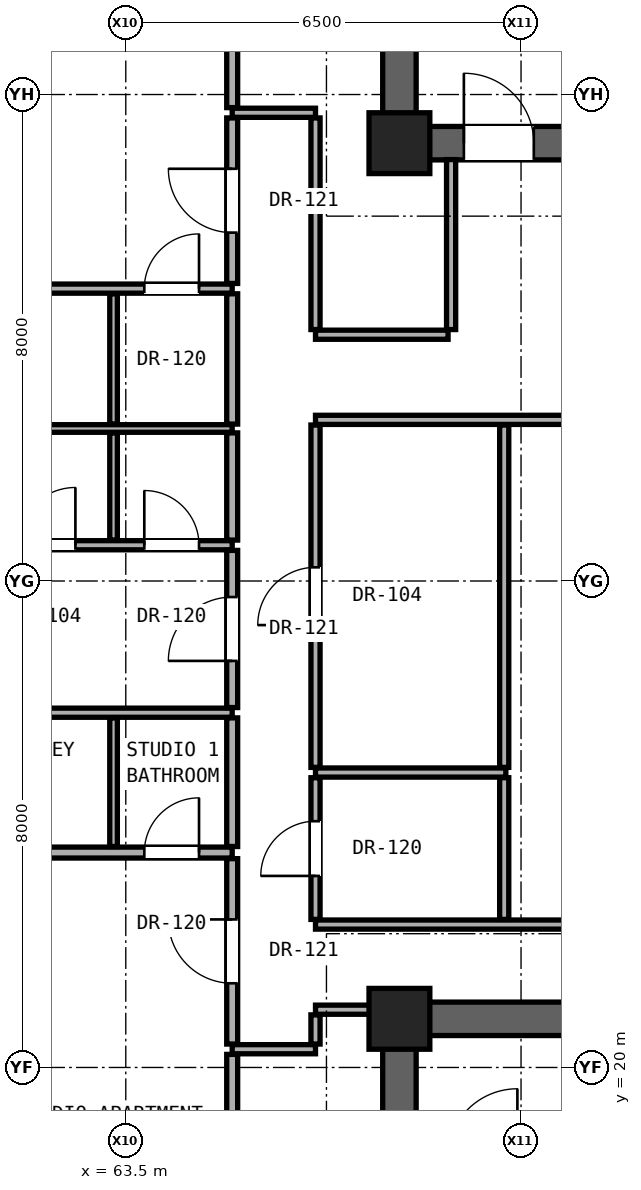
"""IFC4 building model, lengths in metres.
Left out: names, types, materials, properties, quantities, classifications, styles, units other than length and angle.
Written with IfcOpenShell. Run it as: python <this file> out.ifc"""

import sys

from ifc_helpers import new_model, si_unit, direction, frame, frame_2d, origin, origin_2d, place, context, subcontext, project, spatial, rectangle, extrude, element, fill, save


model = new_model("IFC4")
c1 = context("Model", 3, precision=1e-05, world=origin(), true_north=direction((0.0, 1.0)))
c2 = subcontext(c1, "Body", "Model", "MODEL_VIEW")
j1 = project(units=[si_unit("LENGTHUNIT", "METRE"), si_unit("PLANEANGLEUNIT", "RADIAN")], contexts=[c1])
p1 = place(None, origin())
s1 = spatial("IfcSite", under=j1, at=p1, CompositionType="ELEMENT")
p2 = place(p1, origin())
s2 = spatial("IfcBuilding", under=s1, at=p2, CompositionType="ELEMENT")
p3 = place(p2, frame((0.0, 0.0, 164.15)))
s3 = spatial("IfcBuildingStorey", under=s2, at=p3, CompositionType="ELEMENT", Elevation=164.15)
for number, where, z_axis, x_axis in (
    (1, (68.0, 20.8, 0.0), (0.0, 0.0, 1.0), (1.0, 0.0, 0.0)),
    (2, (68.0, 35.2, 0.0), (0.0, 0.0, 1.0), (1.0, 0.0, 0.0)),
):
    element("IfcColumn", number, at=place(p3, frame(where, z_axis=z_axis, x_axis=x_axis)), inside=s3, PredefinedType="COLUMN", context=c2, shape_type="SweptSolid", body=[
        extrude(rectangle(XDim=1.0, YDim=1.0, at=origin_2d()), origin(), (0.0, 0.0, 1.0), 3.25),
    ])
p4 = place(p3, frame((68.0, 35.2, 0.0), z_axis=(0.0, 0.0, 1.0), x_axis=(0.0, 1.0, 0.0)))
e3 = element("IfcWall", 3, at=p4, inside=s3, PredefinedType="SHEAR", context=c2, shape_type="SweptSolid", body=[
    extrude(rectangle(XDim=5.6, YDim=0.55, at=frame_2d((2.8, 0.0))), origin(), (0.0, 0.0, 1.0), 3.05),
])
p5 = place(p3, frame((68.0, 35.2, 0.0), z_axis=(0.0, 0.0, 1.0), x_axis=(1.0, 0.0, 0.0)))
e4 = element("IfcWall", 4, at=p5, inside=s3, PredefinedType="SHEAR", context=c2, shape_type="SweptSolid", body=[
    extrude(rectangle(XDim=17.0, YDim=0.55, at=frame_2d((8.5, 0.0))), origin(), (0.0, 0.0, 1.0), 3.05),
])
p6 = place(p5, frame((1.06, 0.0, 0.0)))
e5 = element("IfcOpeningElement", 5, at=p6, cuts=e4, PredefinedType="OPENING", context=c2, shape_type="SweptSolid", body=[
    extrude(rectangle(XDim=1.15, YDim=2.2, at=frame_2d((0.575, 1.1))), frame((0.0, 0.285, 0.0), z_axis=(0.0, -1.0, 0.0), x_axis=(1.0, 0.0, 0.0)), (0.0, 0.0, 1.0), 0.57),
])
p7 = place(p5, frame((8.75, 0.0, 0.0)))
e6 = element("IfcOpeningElement", 6, at=p7, cuts=e4, PredefinedType="OPENING", context=c2, shape_type="SweptSolid", body=[
    extrude(rectangle(XDim=1.4, YDim=2.35, at=frame_2d((0.7, 1.175))), frame((0.0, 0.285, 0.0), z_axis=(0.0, -1.0, 0.0), x_axis=(1.0, 0.0, 0.0)), (0.0, 0.0, 1.0), 0.57),
])
p8 = place(p5, frame((10.77, 0.0, 0.0)))
e7 = element("IfcOpeningElement", 7, at=p8, cuts=e4, PredefinedType="OPENING", context=c2, shape_type="SweptSolid", body=[
    extrude(rectangle(XDim=1.3, YDim=2.3, at=frame_2d((0.65, 1.15))), frame((0.0, 0.285, 0.0), z_axis=(0.0, -1.0, 0.0), x_axis=(1.0, 0.0, 0.0)), (0.0, 0.0, 1.0), 0.57),
])
p9 = place(p3, frame((68.0, 15.2, 0.0), z_axis=(0.0, 0.0, 1.0), x_axis=(0.0, 1.0, 0.0)))
e8 = element("IfcWall", 8, at=p9, inside=s3, PredefinedType="SHEAR", context=c2, shape_type="SweptSolid", body=[
    extrude(rectangle(XDim=5.6, YDim=0.55, at=frame_2d((2.8, 0.0))), origin(), (0.0, 0.0, 1.0), 3.05),
])
p10 = place(p3, frame((68.0, 20.8, 0.0), z_axis=(0.0, 0.0, 1.0), x_axis=(1.0, 0.0, 0.0)))
e9 = element("IfcWall", 9, at=p10, inside=s3, PredefinedType="SHEAR", context=c2, shape_type="SweptSolid", body=[
    extrude(rectangle(XDim=17.0, YDim=0.55, at=frame_2d((8.5, 0.0))), origin(), (0.0, 0.0, 1.0), 3.05),
])
p11 = place(p10, frame((9.55, 0.0, 0.0)))
e10 = element("IfcOpeningElement", 10, at=p11, cuts=e9, PredefinedType="OPENING", context=c2, shape_type="SweptSolid", body=[
    extrude(rectangle(XDim=1.3, YDim=2.3, at=frame_2d((0.65, 1.15))), frame((0.0, 0.285, 0.0), z_axis=(0.0, -1.0, 0.0), x_axis=(1.0, 0.0, 0.0)), (0.0, 0.0, 1.0), 0.57),
])
p12 = place(p10, frame((12.05, 0.0, 0.0)))
e11 = element("IfcOpeningElement", 11, at=p12, cuts=e9, PredefinedType="OPENING", context=c2, shape_type="SweptSolid", body=[
    extrude(rectangle(XDim=1.3, YDim=2.3, at=frame_2d((0.65, 1.15))), frame((0.0, 0.285, 0.0), z_axis=(0.0, -1.0, 0.0), x_axis=(1.0, 0.0, 0.0)), (0.0, 0.0, 1.0), 0.57),
])
p13 = place(p3, frame((65.25, 20.3, 0.0), z_axis=(0.0, 0.0, 1.0), x_axis=(1.0, 0.0, 0.0)))
e12 = element("IfcWall", 12, at=p13, inside=s3, PredefinedType="PARTITIONING", context=c2, shape_type="SweptSolid", body=[
    extrude(rectangle(XDim=1.37, YDim=0.15, at=frame_2d((0.685, 0.0))), origin(), (0.0, 0.0, 1.0), 3.05),
])
p14 = place(p3, frame((66.62, 20.95, 0.0), z_axis=(0.0, 0.0, 1.0), x_axis=(1.0, 0.0, 0.0)))
e13 = element("IfcWall", 13, at=p14, inside=s3, PredefinedType="PARTITIONING", context=c2, shape_type="SweptSolid", body=[
    extrude(rectangle(XDim=1.11, YDim=0.15, at=frame_2d((0.555, 0.0))), origin(), (0.0, 0.0, 1.0), 2.442),
])
p15 = place(p3, frame((66.62, 22.35, 0.0), z_axis=(0.0, 0.0, 1.0), x_axis=(1.0, 0.0, 0.0)))
e14 = element("IfcWall", 14, at=p15, inside=s3, PredefinedType="PARTITIONING", context=c2, shape_type="SweptSolid", body=[
    extrude(rectangle(XDim=10.14, YDim=0.15, at=frame_2d((5.07, 0.0))), origin(), (0.0, 0.0, 1.0), 2.186),
])
p16 = place(p3, frame((59.154, 23.534, 0.0), z_axis=(0.0, 0.0, 1.0), x_axis=(1.0, 0.0, 0.0)))
e15 = element("IfcWall", 15, at=p16, inside=s3, PredefinedType="PARTITIONING", context=c2, shape_type="SweptSolid", body=[
    extrude(rectangle(XDim=6.096, YDim=0.18, at=frame_2d((3.048, 0.0))), origin(), (0.0, 0.0, 1.0), 2.269),
])
p17 = place(p16, frame((1.617, 0.0, 0.0)))
e16 = element("IfcOpeningElement", 16, at=p17, cuts=e15, PredefinedType="OPENING", context=c2, shape_type="SweptSolid", body=[
    extrude(rectangle(XDim=0.95, YDim=2.15, at=frame_2d((0.475, 1.075))), frame((0.0, 0.1, 0.0), z_axis=(0.0, -1.0, 0.0), x_axis=(1.0, 0.0, 0.0)), (0.0, 0.0, 1.0), 0.2),
])
p18 = place(p16, frame((4.65, 0.0, 0.0)))
e17 = element("IfcOpeningElement", 17, at=p18, cuts=e15, PredefinedType="OPENING", context=c2, shape_type="SweptSolid", body=[
    extrude(rectangle(XDim=0.9, YDim=2.1, at=frame_2d((0.45, 1.05))), frame((0.0, 0.1, 0.0), z_axis=(0.0, -1.0, 0.0), x_axis=(1.0, 0.0, 0.0)), (0.0, 0.0, 1.0), 0.2),
])
p19 = place(p3, frame((66.62, 24.85, 0.0), z_axis=(0.0, 0.0, 1.0), x_axis=(1.0, 0.0, 0.0)))
e18 = element("IfcWall", 18, at=p19, inside=s3, PredefinedType="PARTITIONING", context=c2, shape_type="SweptSolid", body=[
    extrude(rectangle(XDim=3.13, YDim=0.15, at=frame_2d((1.565, 0.0))), origin(), (0.0, 0.0, 1.0), 2.186),
])
p20 = place(p3, frame((59.154, 25.834, 0.0), z_axis=(0.0, 0.0, 1.0), x_axis=(1.0, 0.0, 0.0)))
e19 = element("IfcWall", 19, at=p20, inside=s3, PredefinedType="PARTITIONING", context=c2, shape_type="SweptSolid", body=[
    extrude(rectangle(XDim=6.096, YDim=0.15, at=frame_2d((3.048, 0.0))), origin(), (0.0, 0.0, 1.0), 2.269),
])
p21 = place(p3, frame((59.154, 28.588, 0.0), z_axis=(0.0, 0.0, 1.0), x_axis=(1.0, 0.0, 0.0)))
e20 = element("IfcWall", 20, at=p21, inside=s3, PredefinedType="PARTITIONING", context=c2, shape_type="SweptSolid", body=[
    extrude(rectangle(XDim=6.096, YDim=0.15, at=frame_2d((3.048, 0.0))), origin(), (0.0, 0.0, 1.0), 2.269),
])
p22 = place(p21, frame((2.567, 0.0, 0.0)))
e21 = element("IfcOpeningElement", 21, at=p22, cuts=e20, PredefinedType="OPENING", context=c2, shape_type="SweptSolid", body=[
    extrude(rectangle(XDim=0.95, YDim=2.15, at=frame_2d((0.475, 1.075))), frame((0.0, 0.085, 0.0), z_axis=(0.0, -1.0, 0.0), x_axis=(1.0, 0.0, 0.0)), (0.0, 0.0, 1.0), 0.17),
])
p23 = place(p21, frame((4.65, 0.0, 0.0)))
e22 = element("IfcOpeningElement", 22, at=p23, cuts=e20, PredefinedType="OPENING", context=c2, shape_type="SweptSolid", body=[
    extrude(rectangle(XDim=0.9, YDim=2.1, at=frame_2d((0.45, 1.05))), frame((0.0, 0.085, 0.0), z_axis=(0.0, -1.0, 0.0), x_axis=(1.0, 0.0, 0.0)), (0.0, 0.0, 1.0), 0.17),
])
p24 = place(p3, frame((59.154, 30.508, 0.0), z_axis=(0.0, 0.0, 1.0), x_axis=(1.0, 0.0, 0.0)))
e23 = element("IfcWall", 23, at=p24, inside=s3, PredefinedType="PARTITIONING", context=c2, shape_type="SweptSolid", body=[
    extrude(rectangle(XDim=6.096, YDim=0.125, at=frame_2d((3.048, 0.0))), origin(), (0.0, 0.0, 1.0), 2.269),
])
p25 = place(p3, frame((66.62, 30.65, 0.0), z_axis=(0.0, 0.0, 1.0), x_axis=(1.0, 0.0, 0.0)))
e24 = element("IfcWall", 24, at=p25, inside=s3, PredefinedType="PARTITIONING", context=c2, shape_type="SweptSolid", body=[
    extrude(rectangle(XDim=10.14, YDim=0.15, at=frame_2d((5.07, 0.0))), origin(), (0.0, 0.0, 1.0), 2.186),
])
p26 = place(p25, frame((6.14, 0.0, 0.0)))
e25 = element("IfcOpeningElement", 25, at=p26, cuts=e24, PredefinedType="OPENING", context=c2, shape_type="SweptSolid", body=[
    extrude(rectangle(XDim=0.95, YDim=2.15, at=frame_2d((0.475, 1.075))), frame((0.0, 0.085, 0.0), z_axis=(0.0, -1.0, 0.0), x_axis=(1.0, 0.0, 0.0)), (0.0, 0.0, 1.0), 0.17),
])
p27 = place(p3, frame((66.62, 32.05, 0.0), z_axis=(0.0, 0.0, 1.0), x_axis=(1.0, 0.0, 0.0)))
e26 = element("IfcWall", 26, at=p27, inside=s3, PredefinedType="PARTITIONING", context=c2, shape_type="SweptSolid", body=[
    extrude(rectangle(XDim=2.18, YDim=0.15, at=frame_2d((1.09, 0.0))), origin(), (0.0, 0.0, 1.0), 2.186),
])
p28 = place(p3, frame((59.154, 32.808, 0.0), z_axis=(0.0, 0.0, 1.0), x_axis=(1.0, 0.0, 0.0)))
e27 = element("IfcWall", 27, at=p28, inside=s3, PredefinedType="PARTITIONING", context=c2, shape_type="SweptSolid", body=[
    extrude(rectangle(XDim=6.096, YDim=0.15, at=frame_2d((3.048, 0.0))), origin(), (0.0, 0.0, 1.0), 2.269),
])
p29 = place(p28, frame((1.617, 0.0, 0.0)))
e28 = element("IfcOpeningElement", 28, at=p29, cuts=e27, PredefinedType="OPENING", context=c2, shape_type="SweptSolid", body=[
    extrude(rectangle(XDim=0.95, YDim=2.15, at=frame_2d((0.475, 1.075))), frame((0.0, 0.085, 0.0), z_axis=(0.0, -1.0, 0.0), x_axis=(1.0, 0.0, 0.0)), (0.0, 0.0, 1.0), 0.17),
])
p30 = place(p28, frame((4.65, 0.0, 0.0)))
e29 = element("IfcOpeningElement", 29, at=p30, cuts=e27, PredefinedType="OPENING", context=c2, shape_type="SweptSolid", body=[
    extrude(rectangle(XDim=0.9, YDim=2.1, at=frame_2d((0.45, 1.05))), frame((0.0, 0.085, 0.0), z_axis=(0.0, -1.0, 0.0), x_axis=(1.0, 0.0, 0.0)), (0.0, 0.0, 1.0), 0.17),
])
p31 = place(p3, frame((65.25, 35.7, 0.0), z_axis=(0.0, 0.0, 1.0), x_axis=(1.0, 0.0, 0.0)))
e30 = element("IfcWall", 30, at=p31, inside=s3, PredefinedType="PARTITIONING", context=c2, shape_type="SweptSolid", body=[
    extrude(rectangle(XDim=1.37, YDim=0.15, at=frame_2d((0.685, 0.0))), origin(), (0.0, 0.0, 1.0), 3.05),
])
p32 = place(p3, frame((63.299, 23.634, 0.0), z_axis=(0.0, 0.0, 1.0), x_axis=(0.0, 1.0, 0.0)))
e31 = element("IfcWall", 31, at=p32, inside=s3, PredefinedType="PARTITIONING", context=c2, shape_type="SweptSolid", body=[
    extrude(rectangle(XDim=2.115, YDim=0.125, at=frame_2d((1.058, 0.0))), origin(), (0.0, 0.0, 1.0), 3.05),
])
p33 = place(p3, frame((63.299, 28.673, 0.0), z_axis=(0.0, 0.0, 1.0), x_axis=(0.0, 1.0, 0.0)))
e32 = element("IfcWall", 32, at=p33, inside=s3, PredefinedType="PARTITIONING", context=c2, shape_type="SweptSolid", body=[
    extrude(rectangle(XDim=1.762, YDim=0.125, at=frame_2d((0.881, 0.0))), origin(), (0.0, 0.0, 1.0), 3.05),
])
p34 = place(p3, frame((63.299, 30.581, 0.0), z_axis=(0.0, 0.0, 1.0), x_axis=(0.0, 1.0, 0.0)))
e33 = element("IfcWall", 33, at=p34, inside=s3, PredefinedType="PARTITIONING", context=c2, shape_type="SweptSolid", body=[
    extrude(rectangle(XDim=2.142, YDim=0.125, at=frame_2d((1.071, 0.0))), origin(), (0.0, 0.0, 1.0), 3.05),
])
p35 = place(p3, frame((65.25, 17.024, 0.0), z_axis=(0.0, 0.0, 1.0), x_axis=(0.0, 1.0, 0.0)))
e34 = element("IfcWall", 34, at=p35, inside=s3, PredefinedType="PARTITIONING", context=c2, shape_type="SweptSolid", body=[
    extrude(rectangle(XDim=3.191, YDim=0.18, at=frame_2d((1.596, 0.0))), origin(), (0.0, 0.0, 1.0), 2.493),
])
p36 = place(p3, frame((65.25, 20.385, 0.0), z_axis=(0.0, 0.0, 1.0), x_axis=(0.0, 1.0, 0.0)))
e35 = element("IfcWall", 35, at=p36, inside=s3, PredefinedType="PARTITIONING", context=c2, shape_type="SweptSolid", body=[
    extrude(rectangle(XDim=3.049, YDim=0.18, at=frame_2d((1.524, 0.0))), origin(), (0.0, 0.0, 1.0), 2.442),
])
p37 = place(p36, frame((1.0, 0.0, 0.0)))
e36 = element("IfcOpeningElement", 36, at=p37, cuts=e35, PredefinedType="OPENING", context=c2, shape_type="SweptSolid", body=[
    extrude(rectangle(XDim=1.05, YDim=2.2, at=frame_2d((0.525, 1.1))), frame((0.0, 0.1, 0.0), z_axis=(0.0, -1.0, 0.0), x_axis=(1.0, 0.0, 0.0)), (0.0, 0.0, 1.0), 0.2),
])
p38 = place(p3, frame((65.25, 23.634, 0.0), z_axis=(0.0, 0.0, 1.0), x_axis=(0.0, 1.0, 0.0)))
e37 = element("IfcWall", 37, at=p38, inside=s3, PredefinedType="PARTITIONING", context=c2, shape_type="SweptSolid", body=[
    extrude(rectangle(XDim=2.115, YDim=0.18, at=frame_2d((1.058, 0.0))), origin(), (0.0, 0.0, 1.0), 3.05),
])
p39 = place(p3, frame((65.25, 25.919, 0.0), z_axis=(0.0, 0.0, 1.0), x_axis=(0.0, 1.0, 0.0)))
e38 = element("IfcWall", 38, at=p39, inside=s3, PredefinedType="PARTITIONING", context=c2, shape_type="SweptSolid", body=[
    extrude(rectangle(XDim=2.584, YDim=0.18, at=frame_2d((1.292, 0.0))), origin(), (0.0, 0.0, 1.0), 2.346),
])
p40 = place(p39, frame((0.767, 0.0, 0.0)))
e39 = element("IfcOpeningElement", 39, at=p40, cuts=e38, PredefinedType="OPENING", context=c2, shape_type="SweptSolid", body=[
    extrude(rectangle(XDim=1.05, YDim=2.2, at=frame_2d((0.525, 1.1))), frame((0.0, 0.1, 0.0), z_axis=(0.0, -1.0, 0.0), x_axis=(1.0, 0.0, 0.0)), (0.0, 0.0, 1.0), 0.2),
])
p41 = place(p3, frame((65.25, 28.673, 0.0), z_axis=(0.0, 0.0, 1.0), x_axis=(0.0, 1.0, 0.0)))
e40 = element("IfcWall", 40, at=p41, inside=s3, PredefinedType="PARTITIONING", context=c2, shape_type="SweptSolid", body=[
    extrude(rectangle(XDim=1.762, YDim=0.18, at=frame_2d((0.881, 0.0))), origin(), (0.0, 0.0, 1.0), 3.05),
])
p42 = place(p3, frame((65.25, 30.581, 0.0), z_axis=(0.0, 0.0, 1.0), x_axis=(0.0, 1.0, 0.0)))
e41 = element("IfcWall", 41, at=p42, inside=s3, PredefinedType="PARTITIONING", context=c2, shape_type="SweptSolid", body=[
    extrude(rectangle(XDim=2.142, YDim=0.18, at=frame_2d((1.071, 0.0))), origin(), (0.0, 0.0, 1.0), 3.05),
])
p43 = place(p3, frame((65.25, 32.893, 0.0), z_axis=(0.0, 0.0, 1.0), x_axis=(0.0, 1.0, 0.0)))
e42 = element("IfcWall", 42, at=p43, inside=s3, PredefinedType="PARTITIONING", context=c2, shape_type="SweptSolid", body=[
    extrude(rectangle(XDim=2.722, YDim=0.18, at=frame_2d((1.361, 0.0))), origin(), (0.0, 0.0, 1.0), 2.442),
])
p44 = place(p43, frame((0.836, 0.0, 0.0)))
e43 = element("IfcOpeningElement", 43, at=p44, cuts=e42, PredefinedType="OPENING", context=c2, shape_type="SweptSolid", body=[
    extrude(rectangle(XDim=1.05, YDim=2.2, at=frame_2d((0.525, 1.1))), frame((0.0, 0.1, 0.0), z_axis=(0.0, -1.0, 0.0), x_axis=(1.0, 0.0, 0.0)), (0.0, 0.0, 1.0), 0.2),
])
p45 = place(p3, frame((65.25, 35.785, 0.0), z_axis=(0.0, 0.0, 1.0), x_axis=(0.0, 1.0, 0.0)))
e44 = element("IfcWall", 44, at=p45, inside=s3, PredefinedType="PARTITIONING", context=c2, shape_type="SweptSolid", body=[
    extrude(rectangle(XDim=3.206, YDim=0.18, at=frame_2d((1.603, 0.0))), origin(), (0.0, 0.0, 1.0), 2.493),
])
p46 = place(p3, frame((66.62, 20.385, 0.0), z_axis=(0.0, 0.0, 1.0), x_axis=(0.0, 1.0, 0.0)))
e45 = element("IfcWall", 45, at=p46, inside=s3, PredefinedType="PARTITIONING", context=c2, shape_type="SweptSolid", body=[
    extrude(rectangle(XDim=0.48, YDim=0.15, at=frame_2d((0.24, 0.0))), origin(), (0.0, 0.0, 1.0), 2.442),
])
p47 = place(p3, frame((66.62, 22.435, 0.0), z_axis=(0.0, 0.0, 1.0), x_axis=(0.0, 1.0, 0.0)))
e46 = element("IfcWall", 46, at=p47, inside=s3, PredefinedType="PARTITIONING", context=c2, shape_type="SweptSolid", body=[
    extrude(rectangle(XDim=2.33, YDim=0.15, at=frame_2d((1.165, 0.0))), origin(), (0.0, 0.0, 1.0), 3.05),
])
p48 = place(p47, frame((0.715, 0.0, 0.0)))
e47 = element("IfcOpeningElement", 47, at=p48, cuts=e46, PredefinedType="OPENING", context=c2, shape_type="SweptSolid", body=[
    extrude(rectangle(XDim=0.9, YDim=2.1, at=frame_2d((0.45, 1.05))), frame((0.0, 0.085, 0.0), z_axis=(0.0, -1.0, 0.0), x_axis=(1.0, 0.0, 0.0)), (0.0, 0.0, 1.0), 0.17),
])
p49 = place(p3, frame((66.62, 24.935, 0.0), z_axis=(0.0, 0.0, 1.0), x_axis=(0.0, 1.0, 0.0)))
e48 = element("IfcWall", 48, at=p49, inside=s3, PredefinedType="PARTITIONING", context=c2, shape_type="SweptSolid", body=[
    extrude(rectangle(XDim=5.63, YDim=0.15, at=frame_2d((2.815, 0.0))), origin(), (0.0, 0.0, 1.0), 2.346),
])
p50 = place(p49, frame((2.34, 0.0, 0.0)))
e49 = element("IfcOpeningElement", 49, at=p50, cuts=e48, PredefinedType="OPENING", context=c2, shape_type="SweptSolid", body=[
    extrude(rectangle(XDim=0.95, YDim=2.15, at=frame_2d((0.475, 1.075))), frame((0.0, 0.085, 0.0), z_axis=(0.0, -1.0, 0.0), x_axis=(1.0, 0.0, 0.0)), (0.0, 0.0, 1.0), 0.17),
])
p51 = place(p3, frame((66.62, 32.135, 0.0), z_axis=(0.0, 0.0, 1.0), x_axis=(0.0, 1.0, 0.0)))
e50 = element("IfcWall", 50, at=p51, inside=s3, PredefinedType="PARTITIONING", context=c2, shape_type="SweptSolid", body=[
    extrude(rectangle(XDim=3.48, YDim=0.15, at=frame_2d((1.74, 0.0))), origin(), (0.0, 0.0, 1.0), 2.442),
])
p52 = place(p3, frame((68.85, 32.135, 0.0), z_axis=(0.0, 0.0, 1.0), x_axis=(0.0, 1.0, 0.0)))
e51 = element("IfcWall", 51, at=p52, inside=s3, PredefinedType="PARTITIONING", context=c2, shape_type="SweptSolid", body=[
    extrude(rectangle(XDim=2.795, YDim=0.15, at=frame_2d((1.397, 0.0))), origin(), (0.0, 0.0, 1.0), 3.05),
])
p53 = place(p3, frame((69.723, 22.435, 0.0), z_axis=(0.0, 0.0, 1.0), x_axis=(0.0, 1.0, 0.0)))
e52 = element("IfcWall", 52, at=p53, inside=s3, PredefinedType="PARTITIONING", context=c2, shape_type="SweptSolid", body=[
    extrude(rectangle(XDim=2.33, YDim=0.15, at=frame_2d((1.165, 0.0))), origin(), (0.0, 0.0, 1.0), 3.05),
])
p54 = place(p3, frame((69.723, 24.935, 0.0), z_axis=(0.0, 0.0, 1.0), x_axis=(0.0, 1.0, 0.0)))
e53 = element("IfcWall", 53, at=p54, inside=s3, PredefinedType="PARTITIONING", context=c2, shape_type="SweptSolid", body=[
    extrude(rectangle(XDim=5.63, YDim=0.15, at=frame_2d((2.815, 0.0))), origin(), (0.0, 0.0, 1.0), 2.186),
])
p55 = place(p6, origin())
e54 = element("IfcDoor", 54, at=p55, inside=s3, OperationType="SINGLE_SWING_LEFT", PredefinedType="DOOR", context=c2, shape_type="SweptSolid", body=[
    extrude(rectangle(XDim=1.15, YDim=2.2, at=frame_2d((0.575, 1.1))), frame((0.0, 0.025, 0.0), z_axis=(0.0, -1.0, 0.0), x_axis=(1.0, 0.0, 0.0)), (0.0, 0.0, 1.0), 0.05),
])
fill(e5, e54)
p56 = place(p48, origin())
e55 = element("IfcDoor", 55, at=p56, inside=s3, OperationType="SINGLE_SWING_LEFT", PredefinedType="DOOR", context=c2, shape_type="SweptSolid", body=[
    extrude(rectangle(XDim=0.9, YDim=2.1, at=frame_2d((0.45, 1.05))), frame((0.0, 0.025, 0.0), z_axis=(0.0, -1.0, 0.0), x_axis=(1.0, 0.0, 0.0)), (0.0, 0.0, 1.0), 0.05),
])
fill(e47, e55)
p57 = place(p37, origin())
e56 = element("IfcDoor", 56, at=p57, inside=s3, OperationType="SINGLE_SWING_RIGHT", PredefinedType="DOOR", context=c2, shape_type="SweptSolid", body=[
    extrude(rectangle(XDim=1.05, YDim=2.2, at=frame_2d((0.525, 1.1))), frame((0.0, 0.025, 0.0), z_axis=(0.0, -1.0, 0.0), x_axis=(1.0, 0.0, 0.0)), (0.0, 0.0, 1.0), 0.05),
])
fill(e36, e56)
p58 = place(p18, origin())
e57 = element("IfcDoor", 57, at=p58, inside=s3, OperationType="SINGLE_SWING_RIGHT", PredefinedType="DOOR", context=c2, shape_type="SweptSolid", body=[
    extrude(rectangle(XDim=0.9, YDim=2.1, at=frame_2d((0.45, 1.05))), frame((0.0, 0.025, 0.0), z_axis=(0.0, -1.0, 0.0), x_axis=(1.0, 0.0, 0.0)), (0.0, 0.0, 1.0), 0.05),
])
fill(e17, e57)
p59 = place(p40, origin())
e58 = element("IfcDoor", 58, at=p59, inside=s3, OperationType="SINGLE_SWING_LEFT", PredefinedType="DOOR", context=c2, shape_type="SweptSolid", body=[
    extrude(rectangle(XDim=1.05, YDim=2.2, at=frame_2d((0.525, 1.1))), frame((0.0, 0.025, 0.0), z_axis=(0.0, -1.0, 0.0), x_axis=(1.0, 0.0, 0.0)), (0.0, 0.0, 1.0), 0.05),
])
fill(e39, e58)
p60 = place(p22, origin())
e59 = element("IfcDoor", 59, at=p60, inside=s3, OperationType="SINGLE_SWING_RIGHT", PredefinedType="DOOR", context=c2, shape_type="SweptSolid", body=[
    extrude(rectangle(XDim=0.95, YDim=2.15, at=frame_2d((0.475, 1.075))), frame((0.0, 0.025, 0.0), z_axis=(0.0, -1.0, 0.0), x_axis=(1.0, 0.0, 0.0)), (0.0, 0.0, 1.0), 0.05),
])
fill(e21, e59)
p61 = place(p23, origin())
e60 = element("IfcDoor", 60, at=p61, inside=s3, OperationType="SINGLE_SWING_LEFT", PredefinedType="DOOR", context=c2, shape_type="SweptSolid", body=[
    extrude(rectangle(XDim=0.9, YDim=2.1, at=frame_2d((0.45, 1.05))), frame((0.0, 0.025, 0.0), z_axis=(0.0, -1.0, 0.0), x_axis=(1.0, 0.0, 0.0)), (0.0, 0.0, 1.0), 0.05),
])
fill(e22, e60)
p62 = place(p44, origin())
e61 = element("IfcDoor", 61, at=p62, inside=s3, OperationType="SINGLE_SWING_RIGHT", PredefinedType="DOOR", context=c2, shape_type="SweptSolid", body=[
    extrude(rectangle(XDim=1.05, YDim=2.2, at=frame_2d((0.525, 1.1))), frame((0.0, 0.025, 0.0), z_axis=(0.0, -1.0, 0.0), x_axis=(1.0, 0.0, 0.0)), (0.0, 0.0, 1.0), 0.05),
])
fill(e43, e61)
p63 = place(p30, origin())
e62 = element("IfcDoor", 62, at=p63, inside=s3, OperationType="SINGLE_SWING_RIGHT", PredefinedType="DOOR", context=c2, shape_type="SweptSolid", body=[
    extrude(rectangle(XDim=0.9, YDim=2.1, at=frame_2d((0.45, 1.05))), frame((0.0, 0.025, 0.0), z_axis=(0.0, -1.0, 0.0), x_axis=(1.0, 0.0, 0.0)), (0.0, 0.0, 1.0), 0.05),
])
fill(e29, e62)
p64 = place(p50, origin())
e63 = element("IfcDoor", 63, at=p64, inside=s3, OperationType="SINGLE_SWING_LEFT", PredefinedType="DOOR", context=c2, shape_type="SweptSolid", body=[
    extrude(rectangle(XDim=0.95, YDim=2.15, at=frame_2d((0.475, 1.075))), frame((0.0, 0.025, 0.0), z_axis=(0.0, -1.0, 0.0), x_axis=(1.0, 0.0, 0.0)), (0.0, 0.0, 1.0), 0.05),
])
fill(e49, e63)
save(model, sys.argv[1])
